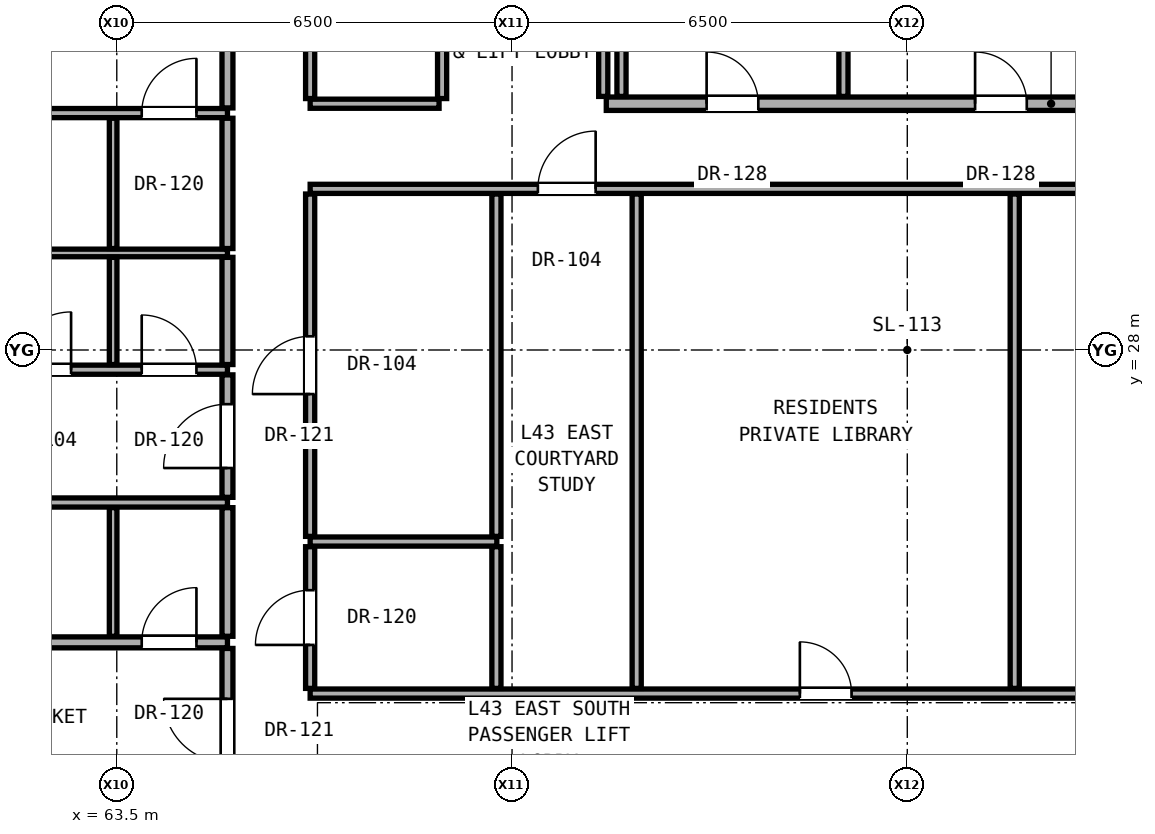
"""IFC4 building model, lengths in metres.
Left out: names, types, materials, properties, quantities, classifications, styles, units other than length and angle.
Written with IfcOpenShell. Run it as: python <this file> out.ifc"""

import sys

from ifc_helpers import new_model, si_unit, direction, frame, frame_2d, origin, place, context, subcontext, project, spatial, rectangle, extrude, element, fill, save


model = new_model("IFC4")
c1 = context("Model", 3, precision=1e-05, world=origin(), true_north=direction((0.0, 1.0)))
c2 = subcontext(c1, "Body", "Model", "MODEL_VIEW")
j1 = project(units=[si_unit("LENGTHUNIT", "METRE"), si_unit("PLANEANGLEUNIT", "RADIAN")], contexts=[c1])
p1 = place(None, origin())
s1 = spatial("IfcSite", under=j1, at=p1, CompositionType="ELEMENT")
p2 = place(p1, origin())
s2 = spatial("IfcBuilding", under=s1, at=p2, CompositionType="ELEMENT")
p3 = place(p2, frame((0.0, 0.0, 154.4)))
s3 = spatial("IfcBuildingStorey", under=s2, at=p3, CompositionType="ELEMENT", Elevation=154.4)
p4 = place(p3, frame((66.68, 22.35, 0.0), z_axis=(0.0, 0.0, 1.0), x_axis=(1.0, 0.0, 0.0)))
e1 = element("IfcWall", 1, at=p4, inside=s3, PredefinedType="PARTITIONING", context=c2, shape_type="SweptSolid", body=[
    extrude(rectangle(XDim=19.5, YDim=0.15, at=frame_2d((9.75, 0.0))), origin(), (0.0, 0.0, 1.0), 2.186),
])
p5 = place(p4, frame((8.053, 0.0, 0.0)))
e2 = element("IfcOpeningElement", 2, at=p5, cuts=e1, PredefinedType="OPENING", context=c2, shape_type="SweptSolid", body=[
    extrude(rectangle(XDim=0.85, YDim=2.01, at=frame_2d((0.425, 1.005))), frame((0.0, 0.085, 0.0), z_axis=(0.0, -1.0, 0.0), x_axis=(1.0, 0.0, 0.0)), (0.0, 0.0, 1.0), 0.17),
])
p6 = place(p3, frame((59.867, 23.192, 0.0), z_axis=(0.0, 0.0, 1.0), x_axis=(1.0, 0.0, 0.0)))
e3 = element("IfcWall", 3, at=p6, inside=s3, PredefinedType="PARTITIONING", context=c2, shape_type="SweptSolid", body=[
    extrude(rectangle(XDim=5.453, YDim=0.18, at=frame_2d((2.727, 0.0))), origin(), (0.0, 0.0, 1.0), 2.269),
])
p7 = place(p6, frame((1.332, 0.0, 0.0)))
e4 = element("IfcOpeningElement", 4, at=p7, cuts=e3, PredefinedType="OPENING", context=c2, shape_type="SweptSolid", body=[
    extrude(rectangle(XDim=0.95, YDim=2.15, at=frame_2d((0.475, 1.075))), frame((0.0, 0.1, 0.0), z_axis=(0.0, -1.0, 0.0), x_axis=(1.0, 0.0, 0.0)), (0.0, 0.0, 1.0), 0.2),
])
p8 = place(p6, frame((4.043, 0.0, 0.0)))
e5 = element("IfcOpeningElement", 5, at=p8, cuts=e3, PredefinedType="OPENING", context=c2, shape_type="SweptSolid", body=[
    extrude(rectangle(XDim=0.9, YDim=2.1, at=frame_2d((0.45, 1.05))), frame((0.0, 0.1, 0.0), z_axis=(0.0, -1.0, 0.0), x_axis=(1.0, 0.0, 0.0)), (0.0, 0.0, 1.0), 0.2),
])
p9 = place(p3, frame((66.68, 24.85, 0.0), z_axis=(0.0, 0.0, 1.0), x_axis=(1.0, 0.0, 0.0)))
e6 = element("IfcWall", 6, at=p9, inside=s3, PredefinedType="PARTITIONING", context=c2, shape_type="SweptSolid", body=[
    extrude(rectangle(XDim=3.07, YDim=0.15, at=frame_2d((1.535, 0.0))), origin(), (0.0, 0.0, 1.0), 2.186),
])
p10 = place(p3, frame((59.867, 25.492, 0.0), z_axis=(0.0, 0.0, 1.0), x_axis=(1.0, 0.0, 0.0)))
e7 = element("IfcWall", 7, at=p10, inside=s3, PredefinedType="PARTITIONING", context=c2, shape_type="SweptSolid", body=[
    extrude(rectangle(XDim=5.453, YDim=0.15, at=frame_2d((2.727, 0.0))), origin(), (0.0, 0.0, 1.0), 2.269),
])
p11 = place(p3, frame((59.867, 27.676, 0.0), z_axis=(0.0, 0.0, 1.0), x_axis=(1.0, 0.0, 0.0)))
e8 = element("IfcWall", 8, at=p11, inside=s3, PredefinedType="PARTITIONING", context=c2, shape_type="SweptSolid", body=[
    extrude(rectangle(XDim=5.453, YDim=0.15, at=frame_2d((2.727, 0.0))), origin(), (0.0, 0.0, 1.0), 2.269),
])
p12 = place(p11, frame((1.931, 0.0, 0.0)))
e9 = element("IfcOpeningElement", 9, at=p12, cuts=e8, PredefinedType="OPENING", context=c2, shape_type="SweptSolid", body=[
    extrude(rectangle(XDim=0.95, YDim=2.15, at=frame_2d((0.475, 1.075))), frame((0.0, 0.085, 0.0), z_axis=(0.0, -1.0, 0.0), x_axis=(1.0, 0.0, 0.0)), (0.0, 0.0, 1.0), 0.17),
])
p13 = place(p11, frame((4.043, 0.0, 0.0)))
e10 = element("IfcOpeningElement", 10, at=p13, cuts=e8, PredefinedType="OPENING", context=c2, shape_type="SweptSolid", body=[
    extrude(rectangle(XDim=0.9, YDim=2.1, at=frame_2d((0.45, 1.05))), frame((0.0, 0.085, 0.0), z_axis=(0.0, -1.0, 0.0), x_axis=(1.0, 0.0, 0.0)), (0.0, 0.0, 1.0), 0.17),
])
p14 = place(p3, frame((59.867, 29.596, 0.0), z_axis=(0.0, 0.0, 1.0), x_axis=(1.0, 0.0, 0.0)))
e11 = element("IfcWall", 11, at=p14, inside=s3, PredefinedType="PARTITIONING", context=c2, shape_type="SweptSolid", body=[
    extrude(rectangle(XDim=5.453, YDim=0.125, at=frame_2d((2.727, 0.0))), origin(), (0.0, 0.0, 1.0), 2.269),
])
p15 = place(p3, frame((66.68, 30.65, 0.0), z_axis=(0.0, 0.0, 1.0), x_axis=(1.0, 0.0, 0.0)))
e12 = element("IfcWall", 12, at=p15, inside=s3, PredefinedType="PARTITIONING", context=c2, shape_type="SweptSolid", body=[
    extrude(rectangle(XDim=19.5, YDim=0.15, at=frame_2d((9.75, 0.0))), origin(), (0.0, 0.0, 1.0), 2.186),
])
p16 = place(p15, frame((3.745, 0.0, 0.0)))
e13 = element("IfcOpeningElement", 13, at=p16, cuts=e12, PredefinedType="OPENING", context=c2, shape_type="SweptSolid", body=[
    extrude(rectangle(XDim=0.95, YDim=2.15, at=frame_2d((0.475, 1.075))), frame((0.0, 0.085, 0.0), z_axis=(0.0, -1.0, 0.0), x_axis=(1.0, 0.0, 0.0)), (0.0, 0.0, 1.0), 0.17),
])
p17 = place(p15, frame((15.098, 0.0, 0.0)))
e14 = element("IfcOpeningElement", 14, at=p17, cuts=e12, PredefinedType="OPENING", context=c2, shape_type="SweptSolid", body=[
    extrude(rectangle(XDim=0.85, YDim=2.01, at=frame_2d((0.425, 1.005))), frame((0.0, 0.085, 0.0), z_axis=(0.0, -1.0, 0.0), x_axis=(1.0, 0.0, 0.0)), (0.0, 0.0, 1.0), 0.17),
])
p18 = place(p3, frame((59.867, 31.896, 0.0), z_axis=(0.0, 0.0, 1.0), x_axis=(1.0, 0.0, 0.0)))
e15 = element("IfcWall", 15, at=p18, inside=s3, PredefinedType="PARTITIONING", context=c2, shape_type="SweptSolid", body=[
    extrude(rectangle(XDim=5.453, YDim=0.15, at=frame_2d((2.727, 0.0))), origin(), (0.0, 0.0, 1.0), 2.269),
])
p19 = place(p18, frame((1.332, 0.0, 0.0)))
e16 = element("IfcOpeningElement", 16, at=p19, cuts=e15, PredefinedType="OPENING", context=c2, shape_type="SweptSolid", body=[
    extrude(rectangle(XDim=0.95, YDim=2.15, at=frame_2d((0.475, 1.075))), frame((0.0, 0.085, 0.0), z_axis=(0.0, -1.0, 0.0), x_axis=(1.0, 0.0, 0.0)), (0.0, 0.0, 1.0), 0.17),
])
p20 = place(p18, frame((4.043, 0.0, 0.0)))
e17 = element("IfcOpeningElement", 17, at=p20, cuts=e15, PredefinedType="OPENING", context=c2, shape_type="SweptSolid", body=[
    extrude(rectangle(XDim=0.9, YDim=2.1, at=frame_2d((0.45, 1.05))), frame((0.0, 0.085, 0.0), z_axis=(0.0, -1.0, 0.0), x_axis=(1.0, 0.0, 0.0)), (0.0, 0.0, 1.0), 0.17),
])
p21 = place(p3, frame((66.68, 32.05, 0.0), z_axis=(0.0, 0.0, 1.0), x_axis=(1.0, 0.0, 0.0)))
e18 = element("IfcWall", 18, at=p21, inside=s3, PredefinedType="PARTITIONING", context=c2, shape_type="SweptSolid", body=[
    extrude(rectangle(XDim=2.12, YDim=0.15, at=frame_2d((1.06, 0.0))), origin(), (0.0, 0.0, 1.0), 2.186),
])
p22 = place(p3, frame((71.55, 32.05, 0.0), z_axis=(0.0, 0.0, 1.0), x_axis=(1.0, 0.0, 0.0)))
e19 = element("IfcWall", 19, at=p22, inside=s3, PredefinedType="SOLIDWALL", context=c2, shape_type="SweptSolid", body=[
    extrude(rectangle(XDim=14.63, YDim=0.22, at=frame_2d((7.315, 0.0))), origin(), (0.0, 0.0, 1.0), 2.186),
])
p23 = place(p22, frame((6.065, 0.0, 0.0)))
e20 = element("IfcOpeningElement", 20, at=p23, cuts=e19, PredefinedType="OPENING", context=c2, shape_type="SweptSolid", body=[
    extrude(rectangle(XDim=0.85, YDim=2.01, at=frame_2d((0.425, 1.005))), frame((0.0, 0.12, 0.0), z_axis=(0.0, -1.0, 0.0), x_axis=(1.0, 0.0, 0.0)), (0.0, 0.0, 1.0), 0.24),
])
p24 = place(p22, frame((10.535, 0.0, 0.0)))
e21 = element("IfcOpeningElement", 21, at=p24, cuts=e19, PredefinedType="OPENING", context=c2, shape_type="SweptSolid", body=[
    extrude(rectangle(XDim=0.95, YDim=2.15, at=frame_2d((0.475, 1.075))), frame((0.0, 0.12, 0.0), z_axis=(0.0, -1.0, 0.0), x_axis=(1.0, 0.0, 0.0)), (0.0, 0.0, 1.0), 0.24),
])
p25 = place(p22, frame((1.65, 0.0, 0.0)))
e22 = element("IfcOpeningElement", 22, at=p25, cuts=e19, PredefinedType="OPENING", context=c2, shape_type="SweptSolid", body=[
    extrude(rectangle(XDim=0.85, YDim=2.01, at=frame_2d((0.425, 1.005))), frame((0.0, 0.12, 0.0), z_axis=(0.0, -1.0, 0.0), x_axis=(1.0, 0.0, 0.0)), (0.0, 0.0, 1.0), 0.24),
])
p26 = place(p3, frame((63.44, 23.292, 0.0), z_axis=(0.0, 0.0, 1.0), x_axis=(0.0, 1.0, 0.0)))
e23 = element("IfcWall", 23, at=p26, inside=s3, PredefinedType="PARTITIONING", context=c2, shape_type="SweptSolid", body=[
    extrude(rectangle(XDim=2.115, YDim=0.125, at=frame_2d((1.058, 0.0))), origin(), (0.0, 0.0, 1.0), 3.05),
])
p27 = place(p3, frame((63.44, 27.761, 0.0), z_axis=(0.0, 0.0, 1.0), x_axis=(0.0, 1.0, 0.0)))
e24 = element("IfcWall", 24, at=p27, inside=s3, PredefinedType="PARTITIONING", context=c2, shape_type="SweptSolid", body=[
    extrude(rectangle(XDim=1.762, YDim=0.125, at=frame_2d((0.881, 0.0))), origin(), (0.0, 0.0, 1.0), 2.346),
])
p28 = place(p3, frame((63.44, 29.668, 0.0), z_axis=(0.0, 0.0, 1.0), x_axis=(0.0, 1.0, 0.0)))
e25 = element("IfcWall", 25, at=p28, inside=s3, PredefinedType="PARTITIONING", context=c2, shape_type="SweptSolid", body=[
    extrude(rectangle(XDim=2.143, YDim=0.125, at=frame_2d((1.071, 0.0))), origin(), (0.0, 0.0, 1.0), 3.05),
])
p29 = place(p3, frame((65.32, 20.385, 0.0), z_axis=(0.0, 0.0, 1.0), x_axis=(0.0, 1.0, 0.0)))
e26 = element("IfcWall", 26, at=p29, inside=s3, PredefinedType="PARTITIONING", context=c2, shape_type="SweptSolid", body=[
    extrude(rectangle(XDim=2.707, YDim=0.18, at=frame_2d((1.354, 0.0))), origin(), (0.0, 0.0, 1.0), 2.442),
])
p30 = place(p29, frame((0.829, 0.0, 0.0)))
e27 = element("IfcOpeningElement", 27, at=p30, cuts=e26, PredefinedType="OPENING", context=c2, shape_type="SweptSolid", body=[
    extrude(rectangle(XDim=1.05, YDim=2.2, at=frame_2d((0.525, 1.1))), frame((0.0, 0.1, 0.0), z_axis=(0.0, -1.0, 0.0), x_axis=(1.0, 0.0, 0.0)), (0.0, 0.0, 1.0), 0.2),
])
p31 = place(p3, frame((65.32, 23.292, 0.0), z_axis=(0.0, 0.0, 1.0), x_axis=(0.0, 1.0, 0.0)))
e28 = element("IfcWall", 28, at=p31, inside=s3, PredefinedType="PARTITIONING", context=c2, shape_type="SweptSolid", body=[
    extrude(rectangle(XDim=2.115, YDim=0.18, at=frame_2d((1.058, 0.0))), origin(), (0.0, 0.0, 1.0), 3.05),
])
p32 = place(p3, frame((65.32, 25.577, 0.0), z_axis=(0.0, 0.0, 1.0), x_axis=(0.0, 1.0, 0.0)))
e29 = element("IfcWall", 29, at=p32, inside=s3, PredefinedType="PARTITIONING", context=c2, shape_type="SweptSolid", body=[
    extrude(rectangle(XDim=2.014, YDim=0.18, at=frame_2d((1.007, 0.0))), origin(), (0.0, 0.0, 1.0), 3.05),
])
p33 = place(p32, frame((0.482, 0.0, 0.0)))
e30 = element("IfcOpeningElement", 30, at=p33, cuts=e29, PredefinedType="OPENING", context=c2, shape_type="SweptSolid", body=[
    extrude(rectangle(XDim=1.05, YDim=2.2, at=frame_2d((0.525, 1.1))), frame((0.0, 0.1, 0.0), z_axis=(0.0, -1.0, 0.0), x_axis=(1.0, 0.0, 0.0)), (0.0, 0.0, 1.0), 0.2),
])
p34 = place(p3, frame((65.32, 27.761, 0.0), z_axis=(0.0, 0.0, 1.0), x_axis=(0.0, 1.0, 0.0)))
e31 = element("IfcWall", 31, at=p34, inside=s3, PredefinedType="PARTITIONING", context=c2, shape_type="SweptSolid", body=[
    extrude(rectangle(XDim=1.762, YDim=0.18, at=frame_2d((0.881, 0.0))), origin(), (0.0, 0.0, 1.0), 2.346),
])
p35 = place(p3, frame((65.32, 29.668, 0.0), z_axis=(0.0, 0.0, 1.0), x_axis=(0.0, 1.0, 0.0)))
e32 = element("IfcWall", 32, at=p35, inside=s3, PredefinedType="PARTITIONING", context=c2, shape_type="SweptSolid", body=[
    extrude(rectangle(XDim=2.143, YDim=0.18, at=frame_2d((1.071, 0.0))), origin(), (0.0, 0.0, 1.0), 3.05),
])
p36 = place(p3, frame((65.32, 31.981, 0.0), z_axis=(0.0, 0.0, 1.0), x_axis=(0.0, 1.0, 0.0)))
e33 = element("IfcWall", 33, at=p36, inside=s3, PredefinedType="PARTITIONING", context=c2, shape_type="SweptSolid", body=[
    extrude(rectangle(XDim=3.634, YDim=0.18, at=frame_2d((1.817, 0.0))), origin(), (0.0, 0.0, 1.0), 2.442),
])
p37 = place(p36, frame((1.292, 0.0, 0.0)))
e34 = element("IfcOpeningElement", 34, at=p37, cuts=e33, PredefinedType="OPENING", context=c2, shape_type="SweptSolid", body=[
    extrude(rectangle(XDim=1.05, YDim=2.2, at=frame_2d((0.525, 1.1))), frame((0.0, 0.1, 0.0), z_axis=(0.0, -1.0, 0.0), x_axis=(1.0, 0.0, 0.0)), (0.0, 0.0, 1.0), 0.2),
])
p38 = place(p3, frame((66.68, 22.435, 0.0), z_axis=(0.0, 0.0, 1.0), x_axis=(0.0, 1.0, 0.0)))
e35 = element("IfcWall", 35, at=p38, inside=s3, PredefinedType="PARTITIONING", context=c2, shape_type="SweptSolid", body=[
    extrude(rectangle(XDim=2.33, YDim=0.15, at=frame_2d((1.165, 0.0))), origin(), (0.0, 0.0, 1.0), 3.05),
])
p39 = place(p38, frame((0.715, 0.0, 0.0)))
e36 = element("IfcOpeningElement", 36, at=p39, cuts=e35, PredefinedType="OPENING", context=c2, shape_type="SweptSolid", body=[
    extrude(rectangle(XDim=0.9, YDim=2.1, at=frame_2d((0.45, 1.05))), frame((0.0, 0.085, 0.0), z_axis=(0.0, -1.0, 0.0), x_axis=(1.0, 0.0, 0.0)), (0.0, 0.0, 1.0), 0.17),
])
p40 = place(p3, frame((66.68, 24.935, 0.0), z_axis=(0.0, 0.0, 1.0), x_axis=(0.0, 1.0, 0.0)))
e37 = element("IfcWall", 37, at=p40, inside=s3, PredefinedType="PARTITIONING", context=c2, shape_type="SweptSolid", body=[
    extrude(rectangle(XDim=5.63, YDim=0.15, at=frame_2d((2.815, 0.0))), origin(), (0.0, 0.0, 1.0), 2.346),
])
p41 = place(p40, frame((2.34, 0.0, 0.0)))
e38 = element("IfcOpeningElement", 38, at=p41, cuts=e37, PredefinedType="OPENING", context=c2, shape_type="SweptSolid", body=[
    extrude(rectangle(XDim=0.95, YDim=2.15, at=frame_2d((0.475, 1.075))), frame((0.0, 0.085, 0.0), z_axis=(0.0, -1.0, 0.0), x_axis=(1.0, 0.0, 0.0)), (0.0, 0.0, 1.0), 0.17),
])
p42 = place(p3, frame((66.68, 32.135, 0.0), z_axis=(0.0, 0.0, 1.0), x_axis=(0.0, 1.0, 0.0)))
e39 = element("IfcWall", 39, at=p42, inside=s3, PredefinedType="PARTITIONING", context=c2, shape_type="SweptSolid", body=[
    extrude(rectangle(XDim=3.48, YDim=0.15, at=frame_2d((1.74, 0.0))), origin(), (0.0, 0.0, 1.0), 2.442),
])
p43 = place(p3, frame((68.85, 32.135, 0.0), z_axis=(0.0, 0.0, 1.0), x_axis=(0.0, 1.0, 0.0)))
e40 = element("IfcWall", 40, at=p43, inside=s3, PredefinedType="PARTITIONING", context=c2, shape_type="SweptSolid", body=[
    extrude(rectangle(XDim=2.795, YDim=0.15, at=frame_2d((1.397, 0.0))), origin(), (0.0, 0.0, 1.0), 3.05),
])
p44 = place(p3, frame((69.743, 22.435, 0.0), z_axis=(0.0, 0.0, 1.0), x_axis=(0.0, 1.0, 0.0)))
e41 = element("IfcWall", 41, at=p44, inside=s3, PredefinedType="PARTITIONING", context=c2, shape_type="SweptSolid", body=[
    extrude(rectangle(XDim=2.33, YDim=0.15, at=frame_2d((1.165, 0.0))), origin(), (0.0, 0.0, 1.0), 3.05),
])
p45 = place(p3, frame((69.743, 24.935, 0.0), z_axis=(0.0, 0.0, 1.0), x_axis=(0.0, 1.0, 0.0)))
e42 = element("IfcWall", 42, at=p45, inside=s3, PredefinedType="PARTITIONING", context=c2, shape_type="SweptSolid", body=[
    extrude(rectangle(XDim=5.63, YDim=0.15, at=frame_2d((2.815, 0.0))), origin(), (0.0, 0.0, 1.0), 2.186),
])
for number, where, z_axis, x_axis in (
    (43, (71.5, 32.17, 0.0), (0.0, 0.0, 1.0), (0.0, 1.0, 0.0)),
    (44, (71.8, 32.17, 0.0), (0.0, 0.0, 1.0), (0.0, 1.0, 0.0)),
):
    element("IfcWall", number, at=place(p3, frame(where, z_axis=z_axis, x_axis=x_axis)), inside=s3, PredefinedType="PARTITIONING", context=c2, shape_type="SweptSolid", body=[
        extrude(rectangle(XDim=2.76, YDim=0.15, at=frame_2d((1.38, 0.0))), origin(), (0.0, 0.0, 1.0), 3.05),
    ])
p46 = place(p3, frame((72.05, 22.435, 0.0), z_axis=(0.0, 0.0, 1.0), x_axis=(0.0, 1.0, 0.0)))
e45 = element("IfcWall", 45, at=p46, inside=s3, PredefinedType="PARTITIONING", context=c2, shape_type="SweptSolid", body=[
    extrude(rectangle(XDim=8.13, YDim=0.15, at=frame_2d((4.065, 0.0))), origin(), (0.0, 0.0, 1.0), 2.186),
])
p47 = place(p3, frame((75.45, 32.17, 0.0), z_axis=(0.0, 0.0, 1.0), x_axis=(0.0, 1.0, 0.0)))
e46 = element("IfcWall", 46, at=p47, inside=s3, PredefinedType="PARTITIONING", context=c2, shape_type="SweptSolid", body=[
    extrude(rectangle(XDim=2.76, YDim=0.15, at=frame_2d((1.38, 0.0))), origin(), (0.0, 0.0, 1.0), 3.05),
])
p48 = place(p3, frame((78.267, 22.435, 0.0), z_axis=(0.0, 0.0, 1.0), x_axis=(0.0, 1.0, 0.0)))
e47 = element("IfcWall", 47, at=p48, inside=s3, PredefinedType="PARTITIONING", context=c2, shape_type="SweptSolid", body=[
    extrude(rectangle(XDim=8.13, YDim=0.15, at=frame_2d((4.065, 0.0))), origin(), (0.0, 0.0, 1.0), 2.186),
])
p49 = place(p23, origin())
e48 = element("IfcDoor", 48, at=p49, inside=s3, OperationType="SINGLE_SWING_LEFT", PredefinedType="DOOR", context=c2, shape_type="SweptSolid", body=[
    extrude(rectangle(XDim=0.85, YDim=2.01, at=frame_2d((0.425, 1.005))), frame((0.0, 0.025, 0.0), z_axis=(0.0, -1.0, 0.0), x_axis=(1.0, 0.0, 0.0)), (0.0, 0.0, 1.0), 0.05),
])
fill(e20, e48)
p50 = place(p25, origin())
e49 = element("IfcDoor", 49, at=p50, inside=s3, OperationType="SINGLE_SWING_LEFT", PredefinedType="DOOR", context=c2, shape_type="SweptSolid", body=[
    extrude(rectangle(XDim=0.85, YDim=2.01, at=frame_2d((0.425, 1.005))), frame((0.0, 0.025, 0.0), z_axis=(0.0, -1.0, 0.0), x_axis=(1.0, 0.0, 0.0)), (0.0, 0.0, 1.0), 0.05),
])
fill(e22, e49)
p51 = place(p39, origin())
e50 = element("IfcDoor", 50, at=p51, inside=s3, OperationType="SINGLE_SWING_LEFT", PredefinedType="DOOR", context=c2, shape_type="SweptSolid", body=[
    extrude(rectangle(XDim=0.9, YDim=2.1, at=frame_2d((0.45, 1.05))), frame((0.0, 0.025, 0.0), z_axis=(0.0, -1.0, 0.0), x_axis=(1.0, 0.0, 0.0)), (0.0, 0.0, 1.0), 0.05),
])
fill(e36, e50)
p52 = place(p30, origin())
e51 = element("IfcDoor", 51, at=p52, inside=s3, OperationType="SINGLE_SWING_RIGHT", PredefinedType="DOOR", context=c2, shape_type="SweptSolid", body=[
    extrude(rectangle(XDim=1.05, YDim=2.2, at=frame_2d((0.525, 1.1))), frame((0.0, 0.025, 0.0), z_axis=(0.0, -1.0, 0.0), x_axis=(1.0, 0.0, 0.0)), (0.0, 0.0, 1.0), 0.05),
])
fill(e27, e51)
p53 = place(p8, origin())
e52 = element("IfcDoor", 52, at=p53, inside=s3, OperationType="SINGLE_SWING_RIGHT", PredefinedType="DOOR", context=c2, shape_type="SweptSolid", body=[
    extrude(rectangle(XDim=0.9, YDim=2.1, at=frame_2d((0.45, 1.05))), frame((0.0, 0.025, 0.0), z_axis=(0.0, -1.0, 0.0), x_axis=(1.0, 0.0, 0.0)), (0.0, 0.0, 1.0), 0.05),
])
fill(e5, e52)
p54 = place(p33, origin())
e53 = element("IfcDoor", 53, at=p54, inside=s3, OperationType="SINGLE_SWING_LEFT", PredefinedType="DOOR", context=c2, shape_type="SweptSolid", body=[
    extrude(rectangle(XDim=1.05, YDim=2.2, at=frame_2d((0.525, 1.1))), frame((0.0, 0.025, 0.0), z_axis=(0.0, -1.0, 0.0), x_axis=(1.0, 0.0, 0.0)), (0.0, 0.0, 1.0), 0.05),
])
fill(e30, e53)
p55 = place(p12, origin())
e54 = element("IfcDoor", 54, at=p55, inside=s3, OperationType="SINGLE_SWING_RIGHT", PredefinedType="DOOR", context=c2, shape_type="SweptSolid", body=[
    extrude(rectangle(XDim=0.95, YDim=2.15, at=frame_2d((0.475, 1.075))), frame((0.0, 0.025, 0.0), z_axis=(0.0, -1.0, 0.0), x_axis=(1.0, 0.0, 0.0)), (0.0, 0.0, 1.0), 0.05),
])
fill(e9, e54)
p56 = place(p13, origin())
e55 = element("IfcDoor", 55, at=p56, inside=s3, OperationType="SINGLE_SWING_LEFT", PredefinedType="DOOR", context=c2, shape_type="SweptSolid", body=[
    extrude(rectangle(XDim=0.9, YDim=2.1, at=frame_2d((0.45, 1.05))), frame((0.0, 0.025, 0.0), z_axis=(0.0, -1.0, 0.0), x_axis=(1.0, 0.0, 0.0)), (0.0, 0.0, 1.0), 0.05),
])
fill(e10, e55)
p57 = place(p20, origin())
e56 = element("IfcDoor", 56, at=p57, inside=s3, OperationType="SINGLE_SWING_RIGHT", PredefinedType="DOOR", context=c2, shape_type="SweptSolid", body=[
    extrude(rectangle(XDim=0.9, YDim=2.1, at=frame_2d((0.45, 1.05))), frame((0.0, 0.025, 0.0), z_axis=(0.0, -1.0, 0.0), x_axis=(1.0, 0.0, 0.0)), (0.0, 0.0, 1.0), 0.05),
])
fill(e17, e56)
p58 = place(p41, origin())
e57 = element("IfcDoor", 57, at=p58, inside=s3, OperationType="SINGLE_SWING_LEFT", PredefinedType="DOOR", context=c2, shape_type="SweptSolid", body=[
    extrude(rectangle(XDim=0.95, YDim=2.15, at=frame_2d((0.475, 1.075))), frame((0.0, 0.025, 0.0), z_axis=(0.0, -1.0, 0.0), x_axis=(1.0, 0.0, 0.0)), (0.0, 0.0, 1.0), 0.05),
])
fill(e38, e57)
p59 = place(p16, origin())
e58 = element("IfcDoor", 58, at=p59, inside=s3, OperationType="SINGLE_SWING_RIGHT", PredefinedType="DOOR", context=c2, shape_type="SweptSolid", body=[
    extrude(rectangle(XDim=0.95, YDim=2.15, at=frame_2d((0.475, 1.075))), frame((0.0, 0.025, 0.0), z_axis=(0.0, -1.0, 0.0), x_axis=(1.0, 0.0, 0.0)), (0.0, 0.0, 1.0), 0.05),
])
fill(e13, e58)
p60 = place(p5, origin())
e59 = element("IfcDoor", 59, at=p60, inside=s3, OperationType="SINGLE_SWING_LEFT", PredefinedType="DOOR", context=c2, shape_type="SweptSolid", body=[
    extrude(rectangle(XDim=0.85, YDim=2.01, at=frame_2d((0.425, 1.005))), frame((0.0, 0.025, 0.0), z_axis=(0.0, -1.0, 0.0), x_axis=(1.0, 0.0, 0.0)), (0.0, 0.0, 1.0), 0.05),
])
fill(e2, e59)
save(model, sys.argv[1])
